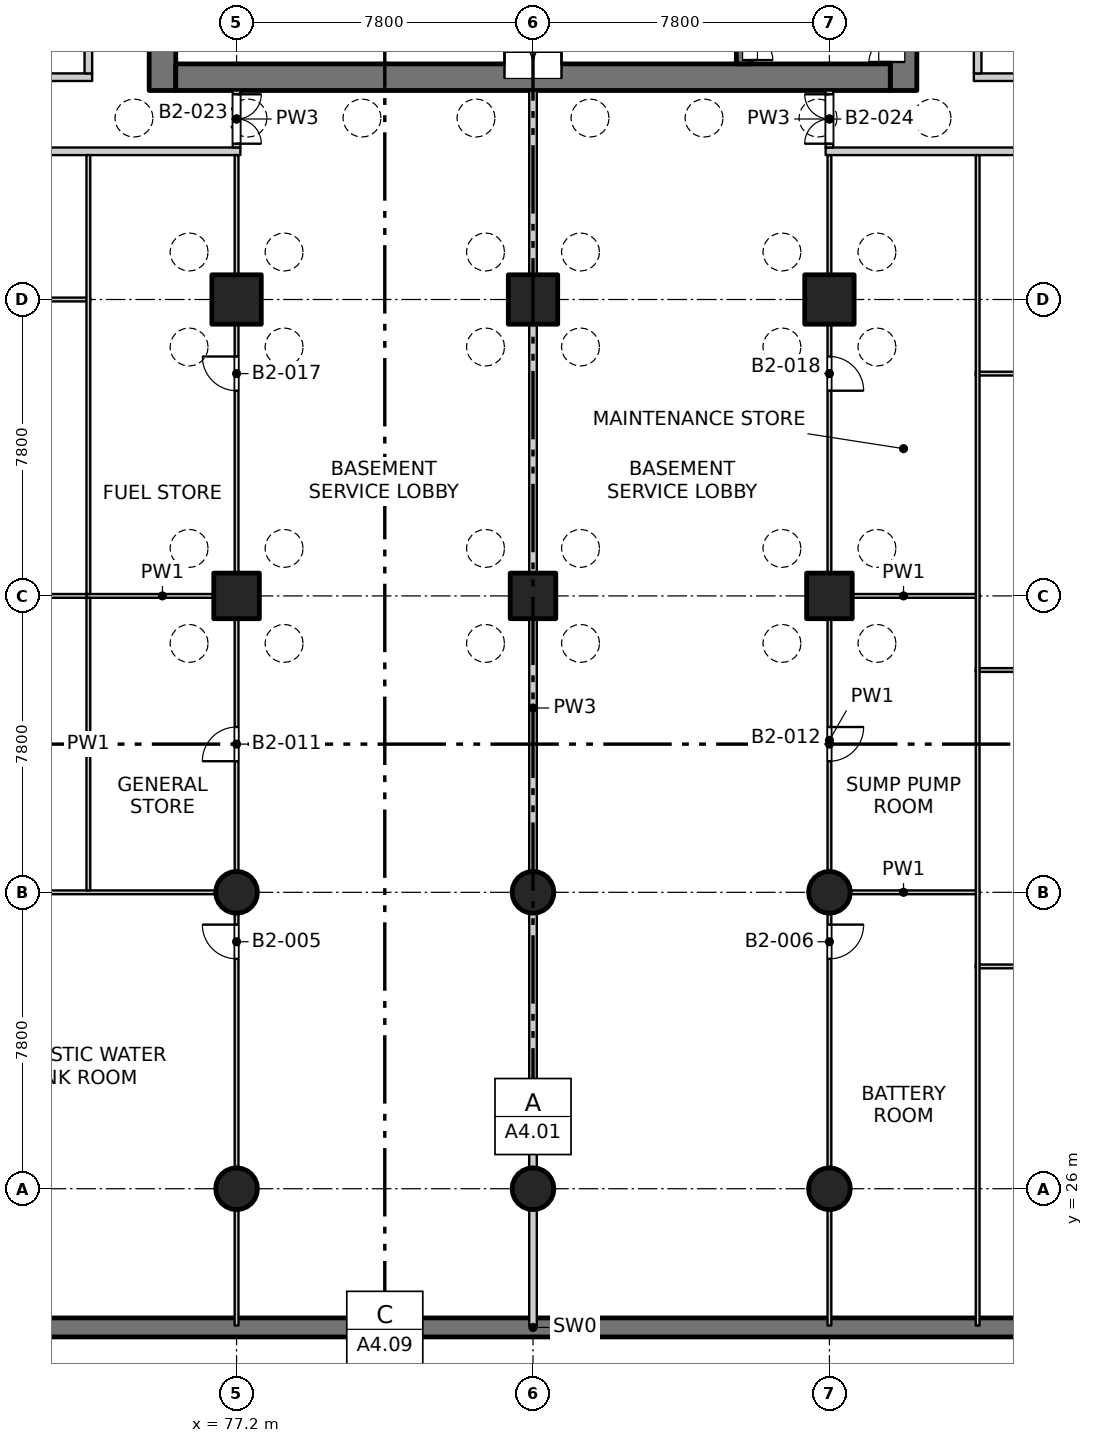
"""IFC4 building model, lengths in metres.
Left out: names, types, materials, properties, quantities, classifications, styles, units other than length and angle.
Written with IfcOpenShell. Run it as: python <this file> out.ifc"""

import sys

from ifc_helpers import new_model, si_unit, direction, frame, frame_2d, origin, origin_2d, place, context, subcontext, project, spatial, rectangle, circle, extrude, element, fill, save


model = new_model("IFC4")
c1 = context("Model", 3, precision=1e-05, world=origin(), true_north=direction((0.0, 1.0)))
c2 = subcontext(c1, "Body", "Model", "MODEL_VIEW")
j1 = project(units=[si_unit("LENGTHUNIT", "METRE"), si_unit("PLANEANGLEUNIT", "RADIAN")], contexts=[c1])
p1 = place(None, origin())
s1 = spatial("IfcSite", under=j1, at=p1, CompositionType="ELEMENT")
p2 = place(p1, origin())
s2 = spatial("IfcBuilding", under=s1, at=p2, CompositionType="ELEMENT")
p3 = place(p2, frame((0.0, 0.0, -9.0)))
s3 = spatial("IfcBuildingStorey", under=s2, at=p3, CompositionType="ELEMENT", Elevation=-9.0)
p4 = place(p3, frame((42.6, 22.35, -0.5), z_axis=(0.0, 0.0, 1.0), x_axis=(1.0, 0.0, 0.0)))
e1 = element("IfcWall", 1, at=p4, inside=s3, PredefinedType="SOLIDWALL", context=c2, shape_type="SweptSolid", body=[
    extrude(rectangle(XDim=84.8, YDim=0.5, at=frame_2d((42.4, 0.0))), origin(), (0.0, 0.0, 1.0), 4.65),
])
for number, where, z_axis, x_axis in (
    (2, (77.2, 41.6, -0.5), (0.0, 0.0, 1.0), (1.0, 0.0, 0.0)),
    (3, (85.0, 41.6, -0.5), (0.0, 0.0, 1.0), (1.0, 0.0, 0.0)),
    (4, (92.8, 41.6, -0.5), (0.0, 0.0, 1.0), (1.0, 0.0, 0.0)),
):
    element("IfcColumn", number, at=place(p3, frame(where, z_axis=z_axis, x_axis=x_axis)), inside=s3, PredefinedType="COLUMN", context=c2, shape_type="SweptSolid", body=[
        extrude(rectangle(XDim=1.2, YDim=1.2, at=origin_2d()), origin(), (0.0, 0.0, 1.0), 4.65),
    ])
for number, where, z_axis, x_axis in (
    (5, (77.2, 49.4, -0.5), (0.0, 0.0, 1.0), (1.0, 0.0, 0.0)),
    (6, (85.0, 49.4, -0.5), (0.0, 0.0, 1.0), (1.0, 0.0, 0.0)),
    (7, (92.8, 49.4, -0.5), (0.0, 0.0, 1.0), (1.0, 0.0, 0.0)),
):
    element("IfcColumn", number, at=place(p3, frame(where, z_axis=z_axis, x_axis=x_axis)), inside=s3, PredefinedType="COLUMN", context=c2, shape_type="SweptSolid", body=[
        extrude(rectangle(XDim=1.3, YDim=1.3, at=origin_2d()), origin(), (0.0, 0.0, 1.0), 4.65),
    ])
for number, where, z_axis, x_axis in (
    (8, (77.2, 26.0, -0.5), (0.0, 0.0, 1.0), (1.0, 0.0, 0.0)),
    (9, (77.2, 33.8, -0.5), (0.0, 0.0, 1.0), (1.0, 0.0, 0.0)),
    (10, (85.0, 26.0, -0.5), (0.0, 0.0, 1.0), (1.0, 0.0, 0.0)),
    (11, (85.0, 33.8, -0.5), (0.0, 0.0, 1.0), (1.0, 0.0, 0.0)),
    (12, (92.8, 26.0, -0.5), (0.0, 0.0, 1.0), (1.0, 0.0, 0.0)),
    (13, (92.8, 33.8, -0.5), (0.0, 0.0, 1.0), (1.0, 0.0, 0.0)),
):
    element("IfcColumn", number, at=place(p3, frame(where, z_axis=z_axis, x_axis=x_axis)), inside=s3, PredefinedType="COLUMN", context=c2, shape_type="SweptSolid", body=[
        extrude(circle(Radius=0.55, at=origin_2d()), origin(), (0.0, 0.0, 1.0), 4.65),
    ])
p5 = place(p3, frame((75.25, 54.9, -0.5), z_axis=(0.0, 0.0, 1.0), x_axis=(0.0, 1.0, 0.0)))
e14 = element("IfcWall", 14, at=p5, inside=s3, PredefinedType="SOLIDWALL", context=c2, shape_type="SweptSolid", body=[
    extrude(rectangle(XDim=22.4, YDim=0.7, at=frame_2d((11.2, 0.0))), origin(), (0.0, 0.0, 1.0), 4.65),
])
p6 = place(p5, frame((7.55, 0.0, 0.5)))
e15 = element("IfcOpeningElement", 15, at=p6, cuts=e14, PredefinedType="OPENING", context=c2, shape_type="SweptSolid", body=[
    extrude(rectangle(XDim=0.9, YDim=2.1, at=frame_2d((0.45, 1.05))), frame((0.0, 0.36, 0.0), z_axis=(0.0, -1.0, 0.0), x_axis=(1.0, 0.0, 0.0)), (0.0, 0.0, 1.0), 0.72),
])
p7 = place(p5, frame((10.85, 0.0, 0.5)))
e16 = element("IfcOpeningElement", 16, at=p7, cuts=e14, PredefinedType="OPENING", context=c2, shape_type="SweptSolid", body=[
    extrude(rectangle(XDim=0.9, YDim=2.1, at=frame_2d((0.45, 1.05))), frame((0.0, 0.36, 0.0), z_axis=(0.0, -1.0, 0.0), x_axis=(1.0, 0.0, 0.0)), (0.0, 0.0, 1.0), 0.72),
])
p8 = place(p5, frame((13.85, 0.0, 0.5)))
e17 = element("IfcOpeningElement", 17, at=p8, cuts=e14, PredefinedType="OPENING", context=c2, shape_type="SweptSolid", body=[
    extrude(rectangle(XDim=0.9, YDim=2.1, at=frame_2d((0.45, 1.05))), frame((0.0, 0.36, 0.0), z_axis=(0.0, -1.0, 0.0), x_axis=(1.0, 0.0, 0.0)), (0.0, 0.0, 1.0), 0.72),
])
p9 = place(p5, frame((16.85, 0.0, 0.5)))
e18 = element("IfcOpeningElement", 18, at=p9, cuts=e14, PredefinedType="OPENING", context=c2, shape_type="SweptSolid", body=[
    extrude(rectangle(XDim=0.9, YDim=2.1, at=frame_2d((0.45, 1.05))), frame((0.0, 0.36, 0.0), z_axis=(0.0, -1.0, 0.0), x_axis=(1.0, 0.0, 0.0)), (0.0, 0.0, 1.0), 0.72),
])
p10 = place(p5, frame((20.15, 0.0, 0.5)))
e19 = element("IfcOpeningElement", 19, at=p10, cuts=e14, PredefinedType="OPENING", context=c2, shape_type="SweptSolid", body=[
    extrude(rectangle(XDim=0.9, YDim=2.1, at=frame_2d((0.45, 1.05))), frame((0.0, 0.36, 0.0), z_axis=(0.0, -1.0, 0.0), x_axis=(1.0, 0.0, 0.0)), (0.0, 0.0, 1.0), 0.72),
])
p11 = place(p3, frame((94.75, 54.9, -0.5), z_axis=(0.0, 0.0, 1.0), x_axis=(0.0, 1.0, 0.0)))
e20 = element("IfcWall", 20, at=p11, inside=s3, PredefinedType="SOLIDWALL", context=c2, shape_type="SweptSolid", body=[
    extrude(rectangle(XDim=7.05, YDim=0.7, at=frame_2d((3.525, 0.0))), origin(), (0.0, 0.0, 1.0), 4.65),
])
p12 = place(p11, frame((0.75, 0.0, 0.5)))
e21 = element("IfcOpeningElement", 21, at=p12, cuts=e20, PredefinedType="OPENING", context=c2, shape_type="SweptSolid", body=[
    extrude(rectangle(XDim=1.2, YDim=2.1, at=frame_2d((0.6, 1.05))), frame((0.0, 0.36, 0.0), z_axis=(0.0, -1.0, 0.0), x_axis=(1.0, 0.0, 0.0)), (0.0, 0.0, 1.0), 0.72),
])
p13 = place(p3, frame((75.6, 55.25, -0.5), z_axis=(0.0, 0.0, 1.0), x_axis=(1.0, 0.0, 0.0)))
e22 = element("IfcWall", 22, at=p13, inside=s3, PredefinedType="SOLIDWALL", context=c2, shape_type="SweptSolid", body=[
    extrude(rectangle(XDim=18.8, YDim=0.7, at=frame_2d((9.4, 0.0))), origin(), (0.0, 0.0, 1.0), 4.65),
])
p14 = place(p13, frame((8.65, 0.0, 0.5)))
e23 = element("IfcOpeningElement", 23, at=p14, cuts=e22, PredefinedType="OPENING", context=c2, shape_type="SweptSolid", body=[
    extrude(rectangle(XDim=1.5, YDim=2.1, at=frame_2d((0.75, 1.05))), frame((0.0, 0.36, 0.0), z_axis=(0.0, -1.0, 0.0), x_axis=(1.0, 0.0, 0.0)), (0.0, 0.0, 1.0), 0.72),
])
p15 = place(p3, frame((90.55, 55.6, -0.5), z_axis=(0.0, 0.0, 1.0), x_axis=(0.0, 1.0, 0.0)))
e24 = element("IfcWall", 24, at=p15, inside=s3, PredefinedType="SOLIDWALL", context=c2, shape_type="SweptSolid", body=[
    extrude(rectangle(XDim=6.35, YDim=0.4, at=frame_2d((3.175, 0.0))), origin(), (0.0, 0.0, 1.0), 4.65),
])
p16 = place(p15, frame((0.1, 0.0, 0.5)))
e25 = element("IfcOpeningElement", 25, at=p16, cuts=e24, PredefinedType="OPENING", context=c2, shape_type="SweptSolid", body=[
    extrude(rectangle(XDim=1.2, YDim=2.1, at=frame_2d((0.6, 1.05))), frame((0.0, 0.21, 0.0), z_axis=(0.0, -1.0, 0.0), x_axis=(1.0, 0.0, 0.0)), (0.0, 0.0, 1.0), 0.42),
])
p17 = place(p3, frame((96.65, 31.85, 0.0), z_axis=(0.0, 0.0, 1.0), x_axis=(1.0, 0.0, 0.0)))
e26 = element("IfcWall", 26, at=p17, inside=s3, PredefinedType="PARTITIONING", context=c2, shape_type="SweptSolid", body=[
    extrude(rectangle(XDim=13.8, YDim=0.1, at=frame_2d((6.9, 0.0))), origin(), (0.0, 0.0, 1.0), 4.15),
])
p18 = place(p3, frame((59.75, 33.8, 0.0), z_axis=(0.0, 0.0, 1.0), x_axis=(1.0, 0.0, 0.0)))
e27 = element("IfcWall", 27, at=p18, inside=s3, PredefinedType="PARTITIONING", context=c2, shape_type="SweptSolid", body=[
    extrude(rectangle(XDim=17.5, YDim=0.1, at=frame_2d((8.75, 0.0))), origin(), (0.0, 0.0, 1.0), 4.15),
])
p19 = place(p3, frame((92.75, 33.8, 0.0), z_axis=(0.0, 0.0, 1.0), x_axis=(1.0, 0.0, 0.0)))
e28 = element("IfcWall", 28, at=p19, inside=s3, PredefinedType="PARTITIONING", context=c2, shape_type="SweptSolid", body=[
    extrude(rectangle(XDim=4.0, YDim=0.1, at=frame_2d((2.0, 0.0))), origin(), (0.0, 0.0, 1.0), 4.15),
])
for number, where, z_axis, x_axis in (
    (29, (96.65, 39.65, 0.0), (0.0, 0.0, 1.0), (1.0, 0.0, 0.0)),
    (30, (59.55, 41.6, 0.0), (0.0, 0.0, 1.0), (1.0, 0.0, 0.0)),
):
    element("IfcWall", number, at=place(p3, frame(where, z_axis=z_axis, x_axis=x_axis)), inside=s3, PredefinedType="PARTITIONING", context=c2, shape_type="SweptSolid", body=[
        extrude(rectangle(XDim=13.8, YDim=0.1, at=frame_2d((6.9, 0.0))), origin(), (0.0, 0.0, 1.0), 4.15),
    ])
for number, where, z_axis, x_axis in (
    (31, (73.25, 41.6, 0.0), (0.0, 0.0, 1.0), (1.0, 0.0, 0.0)),
    (32, (92.75, 41.6, 0.0), (0.0, 0.0, 1.0), (1.0, 0.0, 0.0)),
):
    element("IfcWall", number, at=place(p3, frame(where, z_axis=z_axis, x_axis=x_axis)), inside=s3, PredefinedType="PARTITIONING", context=c2, shape_type="SweptSolid", body=[
        extrude(rectangle(XDim=4.0, YDim=0.1, at=frame_2d((2.0, 0.0))), origin(), (0.0, 0.0, 1.0), 4.15),
    ])
for number, where, z_axis, x_axis in (
    (33, (96.65, 47.45, 0.0), (0.0, 0.0, 1.0), (1.0, 0.0, 0.0)),
    (34, (59.55, 49.4, 0.0), (0.0, 0.0, 1.0), (1.0, 0.0, 0.0)),
):
    element("IfcWall", number, at=place(p3, frame(where, z_axis=z_axis, x_axis=x_axis)), inside=s3, PredefinedType="PARTITIONING", context=c2, shape_type="SweptSolid", body=[
        extrude(rectangle(XDim=13.8, YDim=0.1, at=frame_2d((6.9, 0.0))), origin(), (0.0, 0.0, 1.0), 4.15),
    ])
for number, where, z_axis, x_axis in (
    (35, (59.55, 53.3, 0.0), (0.0, 0.0, 1.0), (1.0, 0.0, 0.0)),
    (36, (92.7, 53.3, 0.0), (0.0, 0.0, 1.0), (1.0, 0.0, 0.0)),
):
    element("IfcWall", number, at=place(p3, frame(where, z_axis=z_axis, x_axis=x_axis)), inside=s3, PredefinedType="PARTITIONING", context=c2, shape_type="SweptSolid", body=[
        extrude(rectangle(XDim=17.75, YDim=0.2, at=frame_2d((8.875, 0.0))), origin(), (0.0, 0.0, 1.0), 4.15),
    ])
for number, where, z_axis, x_axis in (
    (37, (59.55, 55.25, 0.0), (0.0, 0.0, 1.0), (1.0, 0.0, 0.0)),
    (38, (96.6, 55.25, 0.0), (0.0, 0.0, 1.0), (1.0, 0.0, 0.0)),
):
    element("IfcWall", number, at=place(p3, frame(where, z_axis=z_axis, x_axis=x_axis)), inside=s3, PredefinedType="PARTITIONING", context=c2, shape_type="SweptSolid", body=[
        extrude(rectangle(XDim=13.85, YDim=0.2, at=frame_2d((6.925, 0.0))), origin(), (0.0, 0.0, 1.0), 4.15),
    ])
p20 = place(p3, frame((73.3, 33.85, 0.0), z_axis=(0.0, 0.0, 1.0), x_axis=(0.0, 1.0, 0.0)))
e39 = element("IfcWall", 39, at=p20, inside=s3, PredefinedType="PARTITIONING", context=c2, shape_type="SweptSolid", body=[
    extrude(rectangle(XDim=7.7, YDim=0.1, at=frame_2d((3.85, 0.0))), origin(), (0.0, 0.0, 1.0), 4.15),
])
p21 = place(p3, frame((73.3, 41.65, 0.0), z_axis=(0.0, 0.0, 1.0), x_axis=(0.0, 1.0, 0.0)))
e40 = element("IfcWall", 40, at=p21, inside=s3, PredefinedType="PARTITIONING", context=c2, shape_type="SweptSolid", body=[
    extrude(rectangle(XDim=11.55, YDim=0.1, at=frame_2d((5.775, 0.0))), origin(), (0.0, 0.0, 1.0), 4.15),
])
p22 = place(p3, frame((73.3, 55.35, 0.0), z_axis=(0.0, 0.0, 1.0), x_axis=(0.0, 1.0, 0.0)))
e41 = element("IfcWall", 41, at=p22, inside=s3, PredefinedType="PARTITIONING", context=c2, shape_type="SweptSolid", body=[
    extrude(rectangle(XDim=36.65, YDim=0.2, at=frame_2d((18.325, 0.0))), origin(), (0.0, 0.0, 1.0), 4.15),
])
p23 = place(p3, frame((77.2, 22.4, 0.0), z_axis=(0.0, 0.0, 1.0), x_axis=(0.0, 1.0, 0.0)))
e42 = element("IfcWall", 42, at=p23, inside=s3, PredefinedType="PARTITIONING", context=c2, shape_type="SweptSolid", body=[
    extrude(rectangle(XDim=19.15, YDim=0.1, at=frame_2d((9.575, 0.0))), origin(), (0.0, 0.0, 1.0), 4.15),
])
p24 = place(p23, frame((9.65, 0.0, 0.0)))
e43 = element("IfcOpeningElement", 43, at=p24, cuts=e42, PredefinedType="OPENING", context=c2, shape_type="SweptSolid", body=[
    extrude(rectangle(XDim=0.9, YDim=2.1, at=frame_2d((0.45, 1.05))), frame((0.0, 0.06, 0.0), z_axis=(0.0, -1.0, 0.0), x_axis=(1.0, 0.0, 0.0)), (0.0, 0.0, 1.0), 0.12),
])
p25 = place(p23, frame((14.85, 0.0, 0.0)))
e44 = element("IfcOpeningElement", 44, at=p25, cuts=e42, PredefinedType="OPENING", context=c2, shape_type="SweptSolid", body=[
    extrude(rectangle(XDim=0.9, YDim=2.1, at=frame_2d((0.45, 1.05))), frame((0.0, 0.06, 0.0), z_axis=(0.0, -1.0, 0.0), x_axis=(1.0, 0.0, 0.0)), (0.0, 0.0, 1.0), 0.12),
])
p26 = place(p3, frame((77.2, 41.65, 0.0), z_axis=(0.0, 0.0, 1.0), x_axis=(0.0, 1.0, 0.0)))
e45 = element("IfcWall", 45, at=p26, inside=s3, PredefinedType="PARTITIONING", context=c2, shape_type="SweptSolid", body=[
    extrude(rectangle(XDim=11.55, YDim=0.1, at=frame_2d((5.775, 0.0))), origin(), (0.0, 0.0, 1.0), 4.15),
])
p27 = place(p26, frame((5.35, 0.0, 0.0)))
e46 = element("IfcOpeningElement", 46, at=p27, cuts=e45, PredefinedType="OPENING", context=c2, shape_type="SweptSolid", body=[
    extrude(rectangle(XDim=0.9, YDim=2.1, at=frame_2d((0.45, 1.05))), frame((0.0, 0.06, 0.0), z_axis=(0.0, -1.0, 0.0), x_axis=(1.0, 0.0, 0.0)), (0.0, 0.0, 1.0), 0.12),
])
p28 = place(p3, frame((77.2, 53.4, 0.0), z_axis=(0.0, 0.0, 1.0), x_axis=(0.0, 1.0, 0.0)))
e47 = element("IfcWall", 47, at=p28, inside=s3, PredefinedType="PARTITIONING", context=c2, shape_type="SweptSolid", body=[
    extrude(rectangle(XDim=1.5, YDim=0.2, at=frame_2d((0.75, 0.0))), origin(), (0.0, 0.0, 1.0), 4.15),
])
p29 = place(p28, frame((0.1, 0.0, 0.0)))
e48 = element("IfcOpeningElement", 48, at=p29, cuts=e47, PredefinedType="OPENING", context=c2, shape_type="SweptSolid", body=[
    extrude(rectangle(XDim=1.3, YDim=2.1, at=frame_2d((0.65, 1.05))), frame((0.0, 0.11, 0.0), z_axis=(0.0, -1.0, 0.0), x_axis=(1.0, 0.0, 0.0)), (0.0, 0.0, 1.0), 0.22),
])
p30 = place(p3, frame((85.0, 22.4, 0.0), z_axis=(0.0, 0.0, 1.0), x_axis=(0.0, 1.0, 0.0)))
e49 = element("IfcWall", 49, at=p30, inside=s3, PredefinedType="PARTITIONING", context=c2, shape_type="SweptSolid", body=[
    extrude(rectangle(XDim=32.5, YDim=0.2, at=frame_2d((16.25, 0.0))), origin(), (0.0, 0.0, 1.0), 4.15),
])
p31 = place(p3, frame((92.8, 22.4, 0.0), z_axis=(0.0, 0.0, 1.0), x_axis=(0.0, 1.0, 0.0)))
e50 = element("IfcWall", 50, at=p31, inside=s3, PredefinedType="PARTITIONING", context=c2, shape_type="SweptSolid", body=[
    extrude(rectangle(XDim=30.8, YDim=0.1, at=frame_2d((15.4, 0.0))), origin(), (0.0, 0.0, 1.0), 4.15),
])
p32 = place(p31, frame((9.65, 0.0, 0.0)))
e51 = element("IfcOpeningElement", 51, at=p32, cuts=e50, PredefinedType="OPENING", context=c2, shape_type="SweptSolid", body=[
    extrude(rectangle(XDim=0.9, YDim=2.1, at=frame_2d((0.45, 1.05))), frame((0.0, 0.06, 0.0), z_axis=(0.0, -1.0, 0.0), x_axis=(1.0, 0.0, 0.0)), (0.0, 0.0, 1.0), 0.12),
])
p33 = place(p31, frame((14.85, 0.0, 0.0)))
e52 = element("IfcOpeningElement", 52, at=p33, cuts=e50, PredefinedType="OPENING", context=c2, shape_type="SweptSolid", body=[
    extrude(rectangle(XDim=0.9, YDim=2.1, at=frame_2d((0.45, 1.05))), frame((0.0, 0.06, 0.0), z_axis=(0.0, -1.0, 0.0), x_axis=(1.0, 0.0, 0.0)), (0.0, 0.0, 1.0), 0.12),
])
p34 = place(p31, frame((24.6, 0.0, 0.0)))
e53 = element("IfcOpeningElement", 53, at=p34, cuts=e50, PredefinedType="OPENING", context=c2, shape_type="SweptSolid", body=[
    extrude(rectangle(XDim=0.9, YDim=2.1, at=frame_2d((0.45, 1.05))), frame((0.0, 0.06, 0.0), z_axis=(0.0, -1.0, 0.0), x_axis=(1.0, 0.0, 0.0)), (0.0, 0.0, 1.0), 0.12),
])
p35 = place(p3, frame((92.8, 53.4, 0.0), z_axis=(0.0, 0.0, 1.0), x_axis=(0.0, 1.0, 0.0)))
e54 = element("IfcWall", 54, at=p35, inside=s3, PredefinedType="PARTITIONING", context=c2, shape_type="SweptSolid", body=[
    extrude(rectangle(XDim=1.5, YDim=0.2, at=frame_2d((0.75, 0.0))), origin(), (0.0, 0.0, 1.0), 4.15),
])
p36 = place(p35, frame((0.1, 0.0, 0.0)))
e55 = element("IfcOpeningElement", 55, at=p36, cuts=e54, PredefinedType="OPENING", context=c2, shape_type="SweptSolid", body=[
    extrude(rectangle(XDim=1.3, YDim=2.1, at=frame_2d((0.65, 1.05))), frame((0.0, 0.11, 0.0), z_axis=(0.0, -1.0, 0.0), x_axis=(1.0, 0.0, 0.0)), (0.0, 0.0, 1.0), 0.22),
])
p37 = place(p3, frame((96.7, 22.4, 0.0), z_axis=(0.0, 0.0, 1.0), x_axis=(0.0, 1.0, 0.0)))
e56 = element("IfcWall", 56, at=p37, inside=s3, PredefinedType="PARTITIONING", context=c2, shape_type="SweptSolid", body=[
    extrude(rectangle(XDim=30.8, YDim=0.1, at=frame_2d((15.4, 0.0))), origin(), (0.0, 0.0, 1.0), 4.15),
])
p38 = place(p3, frame((96.7, 55.35, 0.0), z_axis=(0.0, 0.0, 1.0), x_axis=(0.0, 1.0, 0.0)))
e57 = element("IfcWall", 57, at=p38, inside=s3, PredefinedType="PARTITIONING", context=c2, shape_type="SweptSolid", body=[
    extrude(rectangle(XDim=36.65, YDim=0.2, at=frame_2d((18.325, 0.0))), origin(), (0.0, 0.0, 1.0), 4.15),
])
p39 = place(p24, origin())
e58 = element("IfcDoor", 58, at=p39, inside=s3, OperationType="SINGLE_SWING_RIGHT", PredefinedType="DOOR", context=c2, shape_type="SweptSolid", body=[
    extrude(rectangle(XDim=0.9, YDim=2.1, at=frame_2d((0.45, 1.05))), frame((0.0, 0.025, 0.0), z_axis=(0.0, -1.0, 0.0), x_axis=(1.0, 0.0, 0.0)), (0.0, 0.0, 1.0), 0.05),
])
fill(e43, e58)
p40 = place(p32, origin())
e59 = element("IfcDoor", 59, at=p40, inside=s3, OperationType="SINGLE_SWING_LEFT", PredefinedType="DOOR", context=c2, shape_type="SweptSolid", body=[
    extrude(rectangle(XDim=0.9, YDim=2.1, at=frame_2d((0.45, 1.05))), frame((0.0, 0.025, 0.0), z_axis=(0.0, -1.0, 0.0), x_axis=(1.0, 0.0, 0.0)), (0.0, 0.0, 1.0), 0.05),
])
fill(e51, e59)
p41 = place(p25, origin())
e60 = element("IfcDoor", 60, at=p41, inside=s3, OperationType="SINGLE_SWING_LEFT", PredefinedType="DOOR", context=c2, shape_type="SweptSolid", body=[
    extrude(rectangle(XDim=0.9, YDim=2.1, at=frame_2d((0.45, 1.05))), frame((0.0, 0.025, 0.0), z_axis=(0.0, -1.0, 0.0), x_axis=(1.0, 0.0, 0.0)), (0.0, 0.0, 1.0), 0.05),
])
fill(e44, e60)
p42 = place(p33, origin())
e61 = element("IfcDoor", 61, at=p42, inside=s3, OperationType="SINGLE_SWING_LEFT", PredefinedType="DOOR", context=c2, shape_type="SweptSolid", body=[
    extrude(rectangle(XDim=0.9, YDim=2.1, at=frame_2d((0.45, 1.05))), frame((0.0, 0.025, 0.0), z_axis=(0.0, -1.0, 0.0), x_axis=(1.0, 0.0, 0.0)), (0.0, 0.0, 1.0), 0.05),
])
fill(e52, e61)
p43 = place(p27, origin())
e62 = element("IfcDoor", 62, at=p43, inside=s3, OperationType="SINGLE_SWING_RIGHT", PredefinedType="DOOR", context=c2, shape_type="SweptSolid", body=[
    extrude(rectangle(XDim=0.9, YDim=2.1, at=frame_2d((0.45, 1.05))), frame((0.0, 0.025, 0.0), z_axis=(0.0, -1.0, 0.0), x_axis=(1.0, 0.0, 0.0)), (0.0, 0.0, 1.0), 0.05),
])
fill(e46, e62)
p44 = place(p34, origin())
e63 = element("IfcDoor", 63, at=p44, inside=s3, OperationType="SINGLE_SWING_RIGHT", PredefinedType="DOOR", context=c2, shape_type="SweptSolid", body=[
    extrude(rectangle(XDim=0.9, YDim=2.1, at=frame_2d((0.45, 1.05))), frame((0.0, 0.025, 0.0), z_axis=(0.0, -1.0, 0.0), x_axis=(1.0, 0.0, 0.0)), (0.0, 0.0, 1.0), 0.05),
])
fill(e53, e63)
p45 = place(p29, origin())
e64 = element("IfcDoor", 64, at=p45, inside=s3, OperationType="DOUBLE_DOOR_SINGLE_SWING", PredefinedType="DOOR", context=c2, shape_type="SweptSolid", body=[
    extrude(rectangle(XDim=1.3, YDim=2.1, at=frame_2d((0.65, 1.05))), frame((0.0, 0.025, 0.0), z_axis=(0.0, -1.0, 0.0), x_axis=(1.0, 0.0, 0.0)), (0.0, 0.0, 1.0), 0.05),
])
fill(e48, e64)
p46 = place(p36, origin())
e65 = element("IfcDoor", 65, at=p46, inside=s3, OperationType="DOUBLE_DOOR_SINGLE_SWING", PredefinedType="DOOR", context=c2, shape_type="SweptSolid", body=[
    extrude(rectangle(XDim=1.3, YDim=2.1, at=frame_2d((0.65, 1.05))), frame((0.0, 0.025, 0.0), z_axis=(0.0, -1.0, 0.0), x_axis=(1.0, 0.0, 0.0)), (0.0, 0.0, 1.0), 0.05),
])
fill(e55, e65)
p47 = place(p14, origin())
e66 = element("IfcDoor", 66, at=p47, inside=s3, OperationType="DOUBLE_DOOR_SINGLE_SWING", PredefinedType="DOOR", context=c2, shape_type="SweptSolid", body=[
    extrude(rectangle(XDim=1.5, YDim=2.1, at=frame_2d((0.75, 1.05))), frame((0.0, 0.335, 0.0), z_axis=(0.0, -1.0, 0.0), x_axis=(1.0, 0.0, 0.0)), (0.0, 0.0, 1.0), 0.05),
])
fill(e23, e66)
p48 = place(p16, origin())
e67 = element("IfcDoor", 67, at=p48, inside=s3, OperationType="DOUBLE_DOOR_SINGLE_SWING", PredefinedType="DOOR", context=c2, shape_type="SweptSolid", body=[
    extrude(rectangle(XDim=1.2, YDim=2.1, at=frame_2d((0.6, 1.05))), frame((0.0, -0.135, 0.0), z_axis=(0.0, -1.0, 0.0), x_axis=(1.0, 0.0, 0.0)), (0.0, 0.0, 1.0), 0.05),
])
fill(e25, e67)
p49 = place(p12, origin())
e68 = element("IfcDoor", 68, at=p49, inside=s3, OperationType="DOUBLE_DOOR_SINGLE_SWING", PredefinedType="DOOR", context=c2, shape_type="SweptSolid", body=[
    extrude(rectangle(XDim=1.2, YDim=2.1, at=frame_2d((0.6, 1.05))), frame((0.0, 0.335, 0.0), z_axis=(0.0, -1.0, 0.0), x_axis=(1.0, 0.0, 0.0)), (0.0, 0.0, 1.0), 0.05),
])
fill(e21, e68)
save(model, sys.argv[1])
